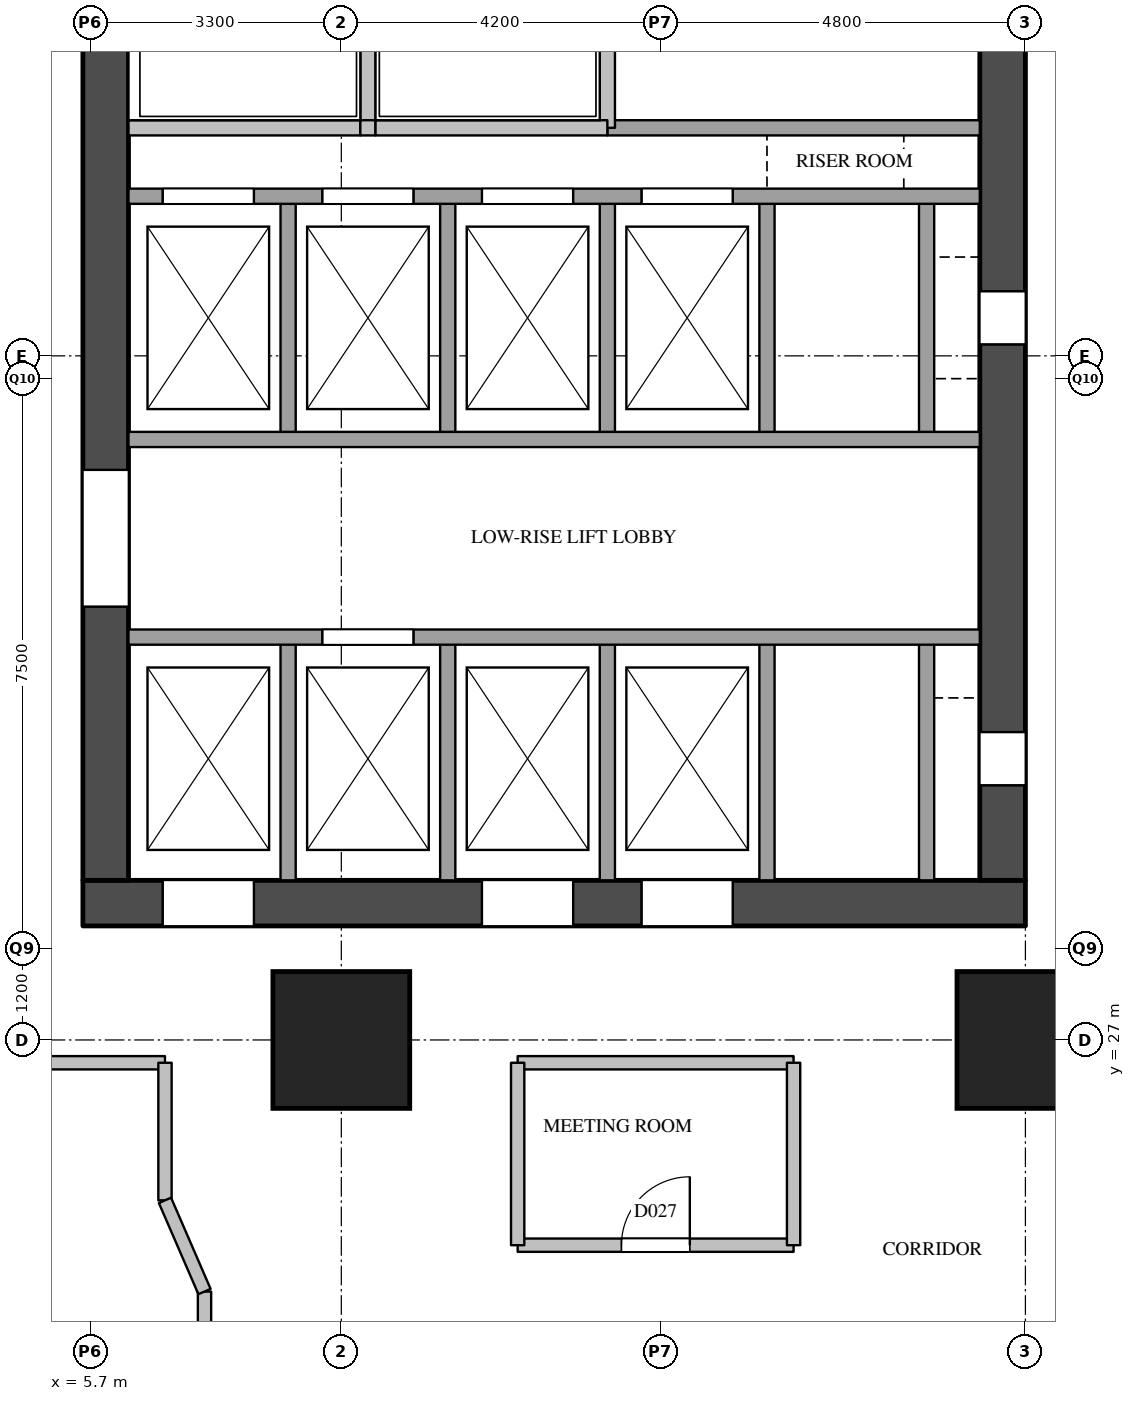
"""IFC4 building model, lengths in metres.
Left out: names, types, materials, properties, quantities, classifications, styles, units other than length and angle.
Written with IfcOpenShell. Run it as: python <this file> out.ifc"""

import sys

from ifc_helpers import new_model, si_unit, direction, frame, frame_2d, origin, origin_2d, place, context, subcontext, project, spatial, rectangle, extrude, element, fill, save


model = new_model("IFC4")
c1 = context("Model", 3, precision=1e-05, world=origin(), true_north=direction((0.0, 1.0)))
c2 = subcontext(c1, "Body", "Model", "MODEL_VIEW")
j1 = project(units=[si_unit("LENGTHUNIT", "METRE"), si_unit("PLANEANGLEUNIT", "RADIAN")], contexts=[c1])
p1 = place(None, origin())
s1 = spatial("IfcSite", under=j1, at=p1, CompositionType="ELEMENT")
p2 = place(p1, origin())
s2 = spatial("IfcBuilding", under=s1, at=p2, CompositionType="ELEMENT")
p3 = place(p2, frame((0.0, 0.0, 34.8)))
s3 = spatial("IfcBuildingStorey", under=s2, at=p3, CompositionType="ELEMENT", Elevation=34.8)
for number, where, z_axis, x_axis in (
    (1, (9.0, 27.0, 0.0), (0.0, 0.0, 1.0), (1.0, 0.0, 0.0)),
    (2, (18.0, 27.0, 0.0), (0.0, 0.0, 1.0), (1.0, 0.0, 0.0)),
):
    element("IfcColumn", number, at=place(p3, frame(where, z_axis=z_axis, x_axis=x_axis)), inside=s3, PredefinedType="COLUMN", context=c2, shape_type="SweptSolid", body=[
        extrude(rectangle(XDim=1.8, YDim=1.8, at=origin_2d()), origin(), (0.0, 0.0, 1.0), 3.8),
    ])
p4 = place(p3, frame((5.6, 28.8, 0.0), z_axis=(0.0, 0.0, 1.0), x_axis=(1.0, 0.0, 0.0)))
e3 = element("IfcWall", 3, at=p4, inside=s3, PredefinedType="SHEAR", context=c2, shape_type="SweptSolid", body=[
    extrude(rectangle(XDim=12.4, YDim=0.6, at=frame_2d((6.2, 0.0))), origin(), (0.0, 0.0, 1.0), 3.5),
])
p5 = place(p4, frame((1.05, 0.0, 0.0)))
e4 = element("IfcOpeningElement", 4, at=p5, cuts=e3, PredefinedType="OPENING", context=c2, shape_type="SweptSolid", body=[
    extrude(rectangle(XDim=1.2, YDim=2.1, at=frame_2d((0.6, 1.05))), frame((0.0, 0.31, 0.0), z_axis=(0.0, -1.0, 0.0), x_axis=(1.0, 0.0, 0.0)), (0.0, 0.0, 1.0), 0.62),
])
p6 = place(p4, frame((5.25, 0.0, 0.0)))
e5 = element("IfcOpeningElement", 5, at=p6, cuts=e3, PredefinedType="OPENING", context=c2, shape_type="SweptSolid", body=[
    extrude(rectangle(XDim=1.2, YDim=2.1, at=frame_2d((0.6, 1.05))), frame((0.0, 0.31, 0.0), z_axis=(0.0, -1.0, 0.0), x_axis=(1.0, 0.0, 0.0)), (0.0, 0.0, 1.0), 0.62),
])
p7 = place(p4, frame((7.35, 0.0, 0.0)))
e6 = element("IfcOpeningElement", 6, at=p7, cuts=e3, PredefinedType="OPENING", context=c2, shape_type="SweptSolid", body=[
    extrude(rectangle(XDim=1.2, YDim=2.1, at=frame_2d((0.6, 1.05))), frame((0.0, 0.31, 0.0), z_axis=(0.0, -1.0, 0.0), x_axis=(1.0, 0.0, 0.0)), (0.0, 0.0, 1.0), 0.62),
])
p8 = place(p3, frame((5.9, 29.1, 0.0), z_axis=(0.0, 0.0, 1.0), x_axis=(0.0, 1.0, 0.0)))
e7 = element("IfcWall", 7, at=p8, inside=s3, PredefinedType="SHEAR", context=c2, shape_type="SweptSolid", body=[
    extrude(rectangle(XDim=20.3, YDim=0.6, at=frame_2d((10.15, 0.0))), origin(), (0.0, 0.0, 1.0), 3.5),
])
p9 = place(p8, frame((3.6, 0.0, 0.0)))
e8 = element("IfcOpeningElement", 8, at=p9, cuts=e7, PredefinedType="OPENING", context=c2, shape_type="SweptSolid", body=[
    extrude(rectangle(XDim=1.8, YDim=2.1, at=frame_2d((0.9, 1.05))), frame((0.0, 0.31, 0.0), z_axis=(0.0, -1.0, 0.0), x_axis=(1.0, 0.0, 0.0)), (0.0, 0.0, 1.0), 0.62),
])
p10 = place(p8, frame((16.4, 0.0, 0.0)))
e9 = element("IfcOpeningElement", 9, at=p10, cuts=e7, PredefinedType="OPENING", context=c2, shape_type="SweptSolid", body=[
    extrude(rectangle(XDim=1.0, YDim=2.1, at=frame_2d((0.5, 1.05))), frame((0.0, 0.31, 0.0), z_axis=(0.0, -1.0, 0.0), x_axis=(1.0, 0.0, 0.0)), (0.0, 0.0, 1.0), 0.62),
])
p11 = place(p3, frame((17.7, 29.1, 0.0), z_axis=(0.0, 0.0, 1.0), x_axis=(0.0, 1.0, 0.0)))
e10 = element("IfcWall", 10, at=p11, inside=s3, PredefinedType="SHEAR", context=c2, shape_type="SweptSolid", body=[
    extrude(rectangle(XDim=20.3, YDim=0.6, at=frame_2d((10.15, 0.0))), origin(), (0.0, 0.0, 1.0), 3.5),
])
p12 = place(p11, frame((1.25, 0.0, 0.0)))
e11 = element("IfcOpeningElement", 11, at=p12, cuts=e10, PredefinedType="OPENING", context=c2, shape_type="SweptSolid", body=[
    extrude(rectangle(XDim=0.7, YDim=2.1, at=frame_2d((0.35, 1.05))), frame((0.0, 0.31, 0.0), z_axis=(0.0, -1.0, 0.0), x_axis=(1.0, 0.0, 0.0)), (0.0, 0.0, 1.0), 0.62),
])
p13 = place(p11, frame((7.05, 0.0, 0.0)))
e12 = element("IfcOpeningElement", 12, at=p13, cuts=e10, PredefinedType="OPENING", context=c2, shape_type="SweptSolid", body=[
    extrude(rectangle(XDim=0.7, YDim=2.1, at=frame_2d((0.35, 1.05))), frame((0.0, 0.31, 0.0), z_axis=(0.0, -1.0, 0.0), x_axis=(1.0, 0.0, 0.0)), (0.0, 0.0, 1.0), 0.62),
])
p14 = place(p3, frame((8.3, 29.1, 0.0), z_axis=(0.0, 0.0, 1.0), x_axis=(0.0, 1.0, 0.0)))
e13 = element("IfcWall", 13, at=p14, inside=s3, PredefinedType="SOLIDWALL", context=c2, shape_type="SweptSolid", body=[
    extrude(rectangle(XDim=3.2, YDim=0.2, at=frame_2d((1.6, 0.0))), origin(), (0.0, 0.0, 1.0), 3.5),
])
p15 = place(p3, frame((8.3, 34.9, 0.0), z_axis=(0.0, 0.0, 1.0), x_axis=(0.0, 1.0, 0.0)))
e14 = element("IfcWall", 14, at=p15, inside=s3, PredefinedType="SOLIDWALL", context=c2, shape_type="SweptSolid", body=[
    extrude(rectangle(XDim=3.2, YDim=0.2, at=frame_2d((1.6, 0.0))), origin(), (0.0, 0.0, 1.0), 3.5),
])
p16 = place(p3, frame((9.35, 39.0, 0.0), z_axis=(0.0, 0.0, 1.0), x_axis=(0.0, 1.0, 0.0)))
e15 = element("IfcWall", 15, at=p16, inside=s3, PredefinedType="SOLIDWALL", context=c2, shape_type="SweptSolid", body=[
    extrude(rectangle(XDim=1.9, YDim=0.2, at=frame_2d((0.95, 0.0))), origin(), (0.0, 0.0, 1.0), 3.5),
])
p17 = place(p3, frame((10.4, 29.1, 0.0), z_axis=(0.0, 0.0, 1.0), x_axis=(0.0, 1.0, 0.0)))
e16 = element("IfcWall", 16, at=p17, inside=s3, PredefinedType="SOLIDWALL", context=c2, shape_type="SweptSolid", body=[
    extrude(rectangle(XDim=3.2, YDim=0.2, at=frame_2d((1.6, 0.0))), origin(), (0.0, 0.0, 1.0), 3.5),
])
p18 = place(p3, frame((10.4, 34.9, 0.0), z_axis=(0.0, 0.0, 1.0), x_axis=(0.0, 1.0, 0.0)))
e17 = element("IfcWall", 17, at=p18, inside=s3, PredefinedType="SOLIDWALL", context=c2, shape_type="SweptSolid", body=[
    extrude(rectangle(XDim=3.2, YDim=0.2, at=frame_2d((1.6, 0.0))), origin(), (0.0, 0.0, 1.0), 3.5),
])
p19 = place(p3, frame((12.5, 29.1, 0.0), z_axis=(0.0, 0.0, 1.0), x_axis=(0.0, 1.0, 0.0)))
e18 = element("IfcWall", 18, at=p19, inside=s3, PredefinedType="SOLIDWALL", context=c2, shape_type="SweptSolid", body=[
    extrude(rectangle(XDim=3.2, YDim=0.2, at=frame_2d((1.6, 0.0))), origin(), (0.0, 0.0, 1.0), 3.5),
])
p20 = place(p3, frame((12.5, 34.9, 0.0), z_axis=(0.0, 0.0, 1.0), x_axis=(0.0, 1.0, 0.0)))
e19 = element("IfcWall", 19, at=p20, inside=s3, PredefinedType="SOLIDWALL", context=c2, shape_type="SweptSolid", body=[
    extrude(rectangle(XDim=3.2, YDim=0.2, at=frame_2d((1.6, 0.0))), origin(), (0.0, 0.0, 1.0), 3.5),
])
p21 = place(p3, frame((12.5, 39.0, 0.0), z_axis=(0.0, 0.0, 1.0), x_axis=(0.0, 1.0, 0.0)))
e20 = element("IfcWall", 20, at=p21, inside=s3, PredefinedType="SOLIDWALL", context=c2, shape_type="SweptSolid", body=[
    extrude(rectangle(XDim=1.9, YDim=0.2, at=frame_2d((0.95, 0.0))), origin(), (0.0, 0.0, 1.0), 3.5),
])
p22 = place(p3, frame((14.6, 29.1, 0.0), z_axis=(0.0, 0.0, 1.0), x_axis=(0.0, 1.0, 0.0)))
e21 = element("IfcWall", 21, at=p22, inside=s3, PredefinedType="SOLIDWALL", context=c2, shape_type="SweptSolid", body=[
    extrude(rectangle(XDim=3.2, YDim=0.2, at=frame_2d((1.6, 0.0))), origin(), (0.0, 0.0, 1.0), 3.5),
])
p23 = place(p3, frame((14.6, 34.9, 0.0), z_axis=(0.0, 0.0, 1.0), x_axis=(0.0, 1.0, 0.0)))
e22 = element("IfcWall", 22, at=p23, inside=s3, PredefinedType="SOLIDWALL", context=c2, shape_type="SweptSolid", body=[
    extrude(rectangle(XDim=3.2, YDim=0.2, at=frame_2d((1.6, 0.0))), origin(), (0.0, 0.0, 1.0), 3.5),
])
p24 = place(p3, frame((16.7, 29.1, 0.0), z_axis=(0.0, 0.0, 1.0), x_axis=(0.0, 1.0, 0.0)))
e23 = element("IfcWall", 23, at=p24, inside=s3, PredefinedType="SOLIDWALL", context=c2, shape_type="SweptSolid", body=[
    extrude(rectangle(XDim=3.2, YDim=0.2, at=frame_2d((1.6, 0.0))), origin(), (0.0, 0.0, 1.0), 3.5),
])
p25 = place(p3, frame((16.7, 34.9, 0.0), z_axis=(0.0, 0.0, 1.0), x_axis=(0.0, 1.0, 0.0)))
e24 = element("IfcWall", 24, at=p25, inside=s3, PredefinedType="SOLIDWALL", context=c2, shape_type="SweptSolid", body=[
    extrude(rectangle(XDim=3.2, YDim=0.2, at=frame_2d((1.6, 0.0))), origin(), (0.0, 0.0, 1.0), 3.5),
])
p26 = place(p3, frame((6.2, 32.3, 0.0), z_axis=(0.0, 0.0, 1.0), x_axis=(1.0, 0.0, 0.0)))
e25 = element("IfcWall", 25, at=p26, inside=s3, PredefinedType="SOLIDWALL", context=c2, shape_type="SweptSolid", body=[
    extrude(rectangle(XDim=11.2, YDim=0.2, at=frame_2d((5.6, 0.0))), origin(), (0.0, 0.0, 1.0), 3.5),
])
p27 = place(p26, frame((2.55, 0.0, 0.0)))
e26 = element("IfcOpeningElement", 26, at=p27, cuts=e25, PredefinedType="OPENING", context=c2, shape_type="SweptSolid", body=[
    extrude(rectangle(XDim=1.2, YDim=2.1, at=frame_2d((0.6, 1.05))), frame((0.0, 0.11, 0.0), z_axis=(0.0, -1.0, 0.0), x_axis=(1.0, 0.0, 0.0)), (0.0, 0.0, 1.0), 0.22),
])
p28 = place(p3, frame((6.2, 34.9, 0.0), z_axis=(0.0, 0.0, 1.0), x_axis=(1.0, 0.0, 0.0)))
e27 = element("IfcWall", 27, at=p28, inside=s3, PredefinedType="SOLIDWALL", context=c2, shape_type="SweptSolid", body=[
    extrude(rectangle(XDim=11.2, YDim=0.2, at=frame_2d((5.6, 0.0))), origin(), (0.0, 0.0, 1.0), 3.5),
])
p29 = place(p3, frame((6.2, 38.1, 0.0), z_axis=(0.0, 0.0, 1.0), x_axis=(1.0, 0.0, 0.0)))
e28 = element("IfcWall", 28, at=p29, inside=s3, PredefinedType="SOLIDWALL", context=c2, shape_type="SweptSolid", body=[
    extrude(rectangle(XDim=11.2, YDim=0.2, at=frame_2d((5.6, 0.0))), origin(), (0.0, 0.0, 1.0), 3.5),
])
p30 = place(p29, frame((0.45, 0.0, 0.0)))
e29 = element("IfcOpeningElement", 29, at=p30, cuts=e28, PredefinedType="OPENING", context=c2, shape_type="SweptSolid", body=[
    extrude(rectangle(XDim=1.2, YDim=2.1, at=frame_2d((0.6, 1.05))), frame((0.0, 0.11, 0.0), z_axis=(0.0, -1.0, 0.0), x_axis=(1.0, 0.0, 0.0)), (0.0, 0.0, 1.0), 0.22),
])
p31 = place(p29, frame((2.55, 0.0, 0.0)))
e30 = element("IfcOpeningElement", 30, at=p31, cuts=e28, PredefinedType="OPENING", context=c2, shape_type="SweptSolid", body=[
    extrude(rectangle(XDim=1.2, YDim=2.1, at=frame_2d((0.6, 1.05))), frame((0.0, 0.11, 0.0), z_axis=(0.0, -1.0, 0.0), x_axis=(1.0, 0.0, 0.0)), (0.0, 0.0, 1.0), 0.22),
])
p32 = place(p29, frame((4.65, 0.0, 0.0)))
e31 = element("IfcOpeningElement", 31, at=p32, cuts=e28, PredefinedType="OPENING", context=c2, shape_type="SweptSolid", body=[
    extrude(rectangle(XDim=1.2, YDim=2.1, at=frame_2d((0.6, 1.05))), frame((0.0, 0.11, 0.0), z_axis=(0.0, -1.0, 0.0), x_axis=(1.0, 0.0, 0.0)), (0.0, 0.0, 1.0), 0.22),
])
p33 = place(p29, frame((6.75, 0.0, 0.0)))
e32 = element("IfcOpeningElement", 32, at=p33, cuts=e28, PredefinedType="OPENING", context=c2, shape_type="SweptSolid", body=[
    extrude(rectangle(XDim=1.2, YDim=2.1, at=frame_2d((0.6, 1.05))), frame((0.0, 0.11, 0.0), z_axis=(0.0, -1.0, 0.0), x_axis=(1.0, 0.0, 0.0)), (0.0, 0.0, 1.0), 0.22),
])
p34 = place(p3, frame((12.5, 39.0, 0.0), z_axis=(0.0, 0.0, 1.0), x_axis=(1.0, 0.0, 0.0)))
e33 = element("IfcWall", 33, at=p34, inside=s3, PredefinedType="SOLIDWALL", context=c2, shape_type="SweptSolid", body=[
    extrude(rectangle(XDim=4.9, YDim=0.2, at=frame_2d((2.45, 0.0))), origin(), (0.0, 0.0, 1.0), 3.5),
])
p35 = place(p3, frame((6.2, 39.0, 0.0), z_axis=(0.0, 0.0, 1.0), x_axis=(1.0, 0.0, 0.0)))
e34 = element("IfcWall", 34, at=p35, inside=s3, PredefinedType="SOLIDWALL", context=c2, shape_type="SweptSolid", body=[
    extrude(rectangle(XDim=3.05, YDim=0.2, at=frame_2d((1.525, 0.0))), origin(), (0.0, 0.0, 1.0), 3.5),
])
p36 = place(p3, frame((9.25, 39.0, 0.0), z_axis=(0.0, 0.0, 1.0), x_axis=(1.0, 0.0, 0.0)))
e35 = element("IfcWall", 35, at=p36, inside=s3, PredefinedType="SOLIDWALL", context=c2, shape_type="SweptSolid", body=[
    extrude(rectangle(XDim=0.2, YDim=0.2, at=frame_2d((0.1, 0.0))), origin(), (0.0, 0.0, 1.0), 3.5),
])
p37 = place(p3, frame((9.45, 39.0, 0.0), z_axis=(0.0, 0.0, 1.0), x_axis=(1.0, 0.0, 0.0)))
e36 = element("IfcWall", 36, at=p37, inside=s3, PredefinedType="SOLIDWALL", context=c2, shape_type="SweptSolid", body=[
    extrude(rectangle(XDim=3.05, YDim=0.2, at=frame_2d((1.525, 0.0))), origin(), (0.0, 0.0, 1.0), 3.5),
])
p38 = place(p3, frame((11.32, 24.3, 0.0), z_axis=(0.0, 0.0, 1.0), x_axis=(1.0, 0.0, 0.0)))
e37 = element("IfcWall", 37, at=p38, inside=s3, PredefinedType="PARTITIONING", context=c2, shape_type="SweptSolid", body=[
    extrude(rectangle(XDim=3.63, YDim=0.175, at=frame_2d((1.815, 0.0))), origin(), (0.0, 0.0, 1.0), 3.5),
])
p39 = place(p38, frame((1.365, 0.0, 0.0)))
e38 = element("IfcOpeningElement", 38, at=p39, cuts=e37, PredefinedType="OPENING", context=c2, shape_type="SweptSolid", body=[
    extrude(rectangle(XDim=0.9, YDim=2.1, at=frame_2d((0.45, 1.05))), frame((0.0, 0.097, 0.0), z_axis=(0.0, -1.0, 0.0), x_axis=(1.0, 0.0, 0.0)), (0.0, 0.0, 1.0), 0.195),
])
p40 = place(p3, frame((3.8, 26.7, 0.0), z_axis=(0.0, 0.0, 1.0), x_axis=(1.0, 0.0, 0.0)))
e39 = element("IfcWall", 39, at=p40, inside=s3, PredefinedType="PARTITIONING", context=c2, shape_type="SweptSolid", body=[
    extrude(rectangle(XDim=2.88, YDim=0.175, at=frame_2d((1.44, 0.0))), origin(), (0.0, 0.0, 1.0), 2.5),
])
p41 = place(p3, frame((11.32, 26.7, 0.0), z_axis=(0.0, 0.0, 1.0), x_axis=(1.0, 0.0, 0.0)))
e40 = element("IfcWall", 40, at=p41, inside=s3, PredefinedType="PARTITIONING", context=c2, shape_type="SweptSolid", body=[
    extrude(rectangle(XDim=3.63, YDim=0.175, at=frame_2d((1.815, 0.0))), origin(), (0.0, 0.0, 1.0), 2.5),
])
p42 = place(p3, frame((6.68, 24.89, 0.0), z_axis=(0.0, 0.0, 1.0), x_axis=(0.0, 1.0, 0.0)))
e41 = element("IfcWall", 41, at=p42, inside=s3, PredefinedType="PARTITIONING", context=c2, shape_type="SweptSolid", body=[
    extrude(rectangle(XDim=1.81, YDim=0.175, at=frame_2d((0.905, 0.0))), origin(), (0.0, 0.0, 1.0), 2.5),
])
p43 = place(p3, frame((7.2, 7.2, 0.0), z_axis=(0.0, 0.0, 1.0), x_axis=(0.0, 1.0, 0.0)))
e42 = element("IfcWall", 42, at=p43, inside=s3, PredefinedType="PARTITIONING", context=c2, shape_type="SweptSolid", body=[
    extrude(rectangle(XDim=16.49, YDim=0.175, at=frame_2d((8.245, 0.0))), origin(), (0.0, 0.0, 1.0), 3.5),
])
p44 = place(p43, frame((5.5, 0.0, 0.0)))
e43 = element("IfcOpeningElement", 43, at=p44, cuts=e42, PredefinedType="OPENING", context=c2, shape_type="SweptSolid", body=[
    extrude(rectangle(XDim=1.0, YDim=2.1, at=frame_2d((0.5, 1.05))), frame((0.0, 0.097, 0.0), z_axis=(0.0, -1.0, 0.0), x_axis=(1.0, 0.0, 0.0)), (0.0, 0.0, 1.0), 0.195),
])
p45 = place(p43, frame((11.5, 0.0, 0.0)))
e44 = element("IfcOpeningElement", 44, at=p45, cuts=e42, PredefinedType="OPENING", context=c2, shape_type="SweptSolid", body=[
    extrude(rectangle(XDim=1.0, YDim=2.1, at=frame_2d((0.5, 1.05))), frame((0.0, 0.097, 0.0), z_axis=(0.0, -1.0, 0.0), x_axis=(1.0, 0.0, 0.0)), (0.0, 0.0, 1.0), 0.195),
])
for number, where, z_axis, x_axis in (
    (45, (11.32, 24.3, 0.0), (0.0, 0.0, 1.0), (0.0, 1.0, 0.0)),
    (46, (14.95, 24.3, 0.0), (0.0, 0.0, 1.0), (0.0, 1.0, 0.0)),
):
    element("IfcWall", number, at=place(p3, frame(where, z_axis=z_axis, x_axis=x_axis)), inside=s3, PredefinedType="PARTITIONING", context=c2, shape_type="SweptSolid", body=[
        extrude(rectangle(XDim=2.4, YDim=0.175, at=frame_2d((1.2, 0.0))), origin(), (0.0, 0.0, 1.0), 2.5),
    ])
p46 = place(p3, frame((7.2, 23.69, 0.0), z_axis=(0.0, 0.0, 1.0), x_axis=(-0.397633632391, 0.917544273804, 0.0)))
e47 = element("IfcWall", 47, at=p46, inside=s3, PredefinedType="PARTITIONING", context=c2, shape_type="SweptSolid", body=[
    extrude(rectangle(XDim=1.308, YDim=0.175, at=frame_2d((0.654, 0.0))), origin(), (0.0, 0.0, 1.0), 3.5),
])
p47 = place(p5, origin())
e48 = element("IfcDoor", 48, at=p47, inside=s3, OperationType="SLIDING_TO_LEFT", PredefinedType="DOOR", context=c2, shape_type="SweptSolid", body=[
    extrude(rectangle(XDim=1.2, YDim=2.1, at=frame_2d((0.6, 1.05))), frame((0.0, 0.025, 0.0), z_axis=(0.0, -1.0, 0.0), x_axis=(1.0, 0.0, 0.0)), (0.0, 0.0, 1.0), 0.05),
])
fill(e4, e48)
p48 = place(p27, origin())
e49 = element("IfcDoor", 49, at=p48, inside=s3, OperationType="SLIDING_TO_LEFT", PredefinedType="DOOR", context=c2, shape_type="SweptSolid", body=[
    extrude(rectangle(XDim=1.2, YDim=2.1, at=frame_2d((0.6, 1.05))), frame((0.0, 0.025, 0.0), z_axis=(0.0, -1.0, 0.0), x_axis=(1.0, 0.0, 0.0)), (0.0, 0.0, 1.0), 0.05),
])
fill(e26, e49)
p49 = place(p6, origin())
e50 = element("IfcDoor", 50, at=p49, inside=s3, OperationType="SLIDING_TO_LEFT", PredefinedType="DOOR", context=c2, shape_type="SweptSolid", body=[
    extrude(rectangle(XDim=1.2, YDim=2.1, at=frame_2d((0.6, 1.05))), frame((0.0, 0.025, 0.0), z_axis=(0.0, -1.0, 0.0), x_axis=(1.0, 0.0, 0.0)), (0.0, 0.0, 1.0), 0.05),
])
fill(e5, e50)
p50 = place(p7, origin())
e51 = element("IfcDoor", 51, at=p50, inside=s3, OperationType="SLIDING_TO_LEFT", PredefinedType="DOOR", context=c2, shape_type="SweptSolid", body=[
    extrude(rectangle(XDim=1.2, YDim=2.1, at=frame_2d((0.6, 1.05))), frame((0.0, 0.025, 0.0), z_axis=(0.0, -1.0, 0.0), x_axis=(1.0, 0.0, 0.0)), (0.0, 0.0, 1.0), 0.05),
])
fill(e6, e51)
p51 = place(p30, origin())
e52 = element("IfcDoor", 52, at=p51, inside=s3, OperationType="SLIDING_TO_LEFT", PredefinedType="DOOR", context=c2, shape_type="SweptSolid", body=[
    extrude(rectangle(XDim=1.2, YDim=2.1, at=frame_2d((0.6, 1.05))), frame((0.0, 0.025, 0.0), z_axis=(0.0, -1.0, 0.0), x_axis=(1.0, 0.0, 0.0)), (0.0, 0.0, 1.0), 0.05),
])
fill(e29, e52)
p52 = place(p31, origin())
e53 = element("IfcDoor", 53, at=p52, inside=s3, OperationType="SLIDING_TO_LEFT", PredefinedType="DOOR", context=c2, shape_type="SweptSolid", body=[
    extrude(rectangle(XDim=1.2, YDim=2.1, at=frame_2d((0.6, 1.05))), frame((0.0, 0.025, 0.0), z_axis=(0.0, -1.0, 0.0), x_axis=(1.0, 0.0, 0.0)), (0.0, 0.0, 1.0), 0.05),
])
fill(e30, e53)
p53 = place(p32, origin())
e54 = element("IfcDoor", 54, at=p53, inside=s3, OperationType="SLIDING_TO_LEFT", PredefinedType="DOOR", context=c2, shape_type="SweptSolid", body=[
    extrude(rectangle(XDim=1.2, YDim=2.1, at=frame_2d((0.6, 1.05))), frame((0.0, 0.025, 0.0), z_axis=(0.0, -1.0, 0.0), x_axis=(1.0, 0.0, 0.0)), (0.0, 0.0, 1.0), 0.05),
])
fill(e31, e54)
p54 = place(p33, origin())
e55 = element("IfcDoor", 55, at=p54, inside=s3, OperationType="SLIDING_TO_LEFT", PredefinedType="DOOR", context=c2, shape_type="SweptSolid", body=[
    extrude(rectangle(XDim=1.2, YDim=2.1, at=frame_2d((0.6, 1.05))), frame((0.0, 0.025, 0.0), z_axis=(0.0, -1.0, 0.0), x_axis=(1.0, 0.0, 0.0)), (0.0, 0.0, 1.0), 0.05),
])
fill(e32, e55)
p55 = place(p12, origin())
e56 = element("IfcDoor", 56, at=p55, inside=s3, OperationType="SINGLE_SWING_LEFT", PredefinedType="DOOR", context=c2, shape_type="SweptSolid", body=[
    extrude(rectangle(XDim=0.7, YDim=2.1, at=frame_2d((0.35, 1.05))), frame((0.0, 0.025, 0.0), z_axis=(0.0, -1.0, 0.0), x_axis=(1.0, 0.0, 0.0)), (0.0, 0.0, 1.0), 0.05),
])
fill(e11, e56)
p56 = place(p13, origin())
e57 = element("IfcDoor", 57, at=p56, inside=s3, OperationType="SINGLE_SWING_LEFT", PredefinedType="DOOR", context=c2, shape_type="SweptSolid", body=[
    extrude(rectangle(XDim=0.7, YDim=2.1, at=frame_2d((0.35, 1.05))), frame((0.0, 0.025, 0.0), z_axis=(0.0, -1.0, 0.0), x_axis=(1.0, 0.0, 0.0)), (0.0, 0.0, 1.0), 0.05),
])
fill(e12, e57)
p57 = place(p9, origin())
e58 = element("IfcDoor", 58, at=p57, inside=s3, OperationType="DOUBLE_DOOR_SINGLE_SWING", PredefinedType="DOOR", context=c2, shape_type="SweptSolid", body=[
    extrude(rectangle(XDim=1.8, YDim=2.1, at=frame_2d((0.9, 1.05))), frame((0.0, 0.025, 0.0), z_axis=(0.0, -1.0, 0.0), x_axis=(1.0, 0.0, 0.0)), (0.0, 0.0, 1.0), 0.05),
])
fill(e8, e58)
p58 = place(p39, origin())
e59 = element("IfcDoor", 59, at=p58, inside=s3, OperationType="SINGLE_SWING_RIGHT", PredefinedType="DOOR", context=c2, shape_type="SweptSolid", body=[
    extrude(rectangle(XDim=0.9, YDim=2.1, at=frame_2d((0.45, 1.05))), frame((0.0, 0.025, 0.0), z_axis=(0.0, -1.0, 0.0), x_axis=(1.0, 0.0, 0.0)), (0.0, 0.0, 1.0), 0.05),
])
fill(e38, e59)
save(model, sys.argv[1])
